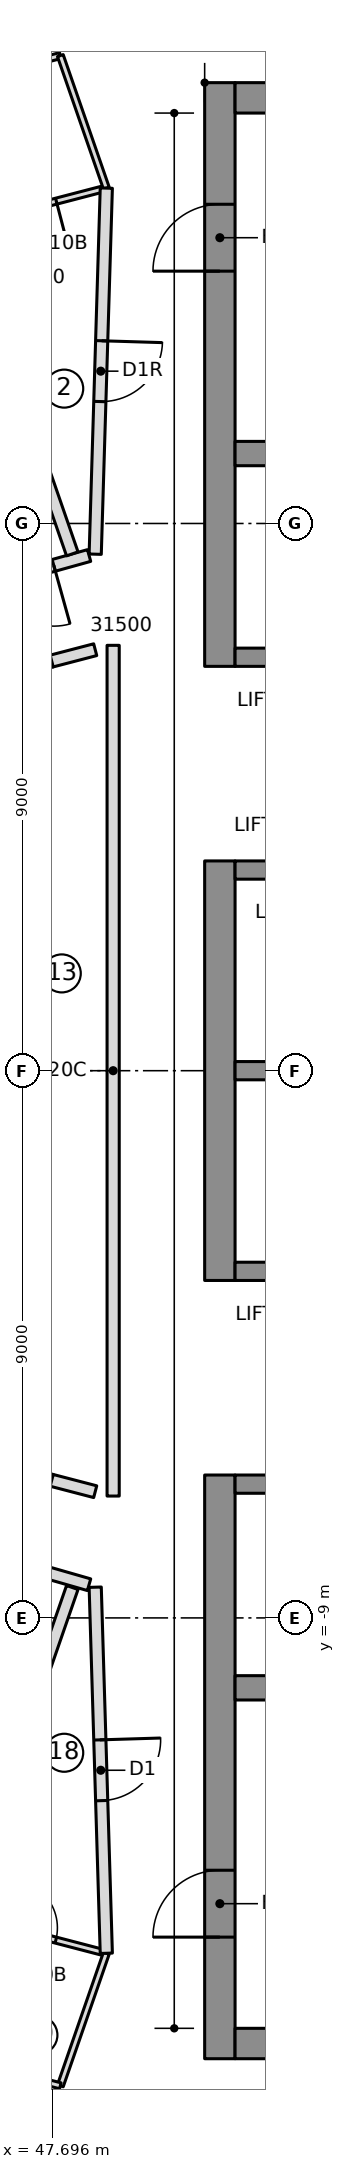
"""IFC4 building model, lengths in metres.
Left out: names, types, materials, properties, quantities, classifications, styles, units other than length and angle.
Written with IfcOpenShell. Run it as: python <this file> out.ifc"""

import sys

from ifc_helpers import new_model, si_unit, direction, frame, frame_2d, origin, place, context, subcontext, project, spatial, rectangle, extrude, element, fill, save


model = new_model("IFC4")
c1 = context("Model", 3, precision=1e-05, world=origin(), true_north=direction((0.0, 1.0)))
c2 = subcontext(c1, "Body", "Model", "MODEL_VIEW")
j1 = project(units=[si_unit("LENGTHUNIT", "METRE"), si_unit("PLANEANGLEUNIT", "RADIAN")], contexts=[c1])
p1 = place(None, origin())
s1 = spatial("IfcSite", under=j1, at=p1, CompositionType="ELEMENT")
p2 = place(p1, origin())
s2 = spatial("IfcBuilding", under=s1, at=p2, CompositionType="ELEMENT")
p3 = place(p2, frame((0.0, 0.0, 289.2)))
s3 = spatial("IfcBuildingStorey", under=s2, at=p3, CompositionType="ELEMENT", Elevation=289.2)
p4 = place(p3, frame((50.45, 6.65, 0.0), z_axis=(0.0, 0.0, 1.0), x_axis=(0.0, 1.0, 0.0)))
e1 = element("IfcWall", 1, at=p4, inside=s3, PredefinedType="SHEAR", context=c2, shape_type="SweptSolid", body=[
    extrude(rectangle(XDim=9.6, YDim=0.5, at=frame_2d((4.8, 0.0))), origin(), (0.0, 0.0, 1.0), 3.55),
])
p5 = place(p4, frame((6.5, 0.0, 0.0)))
e2 = element("IfcOpeningElement", 2, at=p5, cuts=e1, PredefinedType="OPENING", context=c2, shape_type="SweptSolid", body=[
    extrude(rectangle(XDim=1.1, YDim=2.1, at=frame_2d((0.55, 1.05))), frame((0.0, 0.26, 0.0), z_axis=(0.0, -1.0, 0.0), x_axis=(1.0, 0.0, 0.0)), (0.0, 0.0, 1.0), 0.52),
])
p6 = place(p3, frame((50.45, -3.45, 0.0), z_axis=(0.0, 0.0, 1.0), x_axis=(0.0, 1.0, 0.0)))
e3 = element("IfcWall", 3, at=p6, inside=s3, PredefinedType="SHEAR", context=c2, shape_type="SweptSolid", body=[
    extrude(rectangle(XDim=6.9, YDim=0.5, at=frame_2d((3.45, 0.0))), origin(), (0.0, 0.0, 1.0), 3.55),
])
p7 = place(p3, frame((50.45, -16.25, 0.0), z_axis=(0.0, 0.0, 1.0), x_axis=(0.0, 1.0, 0.0)))
e4 = element("IfcWall", 4, at=p7, inside=s3, PredefinedType="SHEAR", context=c2, shape_type="SweptSolid", body=[
    extrude(rectangle(XDim=9.6, YDim=0.5, at=frame_2d((4.8, 0.0))), origin(), (0.0, 0.0, 1.0), 3.55),
])
p8 = place(p7, frame((2.0, 0.0, 0.0)))
e5 = element("IfcOpeningElement", 5, at=p8, cuts=e4, PredefinedType="OPENING", context=c2, shape_type="SweptSolid", body=[
    extrude(rectangle(XDim=1.1, YDim=2.1, at=frame_2d((0.55, 1.05))), frame((0.0, 0.26, 0.0), z_axis=(0.0, -1.0, 0.0), x_axis=(1.0, 0.0, 0.0)), (0.0, 0.0, 1.0), 0.52),
])
for number, where, z_axis, x_axis in (
    (6, (50.7, 16.0, 0.0), (0.0, 0.0, 1.0), (1.0, 0.0, 0.0)),
    (7, (50.7, -16.0, 0.0), (0.0, 0.0, 1.0), (1.0, 0.0, 0.0)),
):
    element("IfcWall", number, at=place(p3, frame(where, z_axis=z_axis, x_axis=x_axis)), inside=s3, PredefinedType="SHEAR", context=c2, shape_type="SweptSolid", body=[
        extrude(rectangle(XDim=13.52, YDim=0.5, at=frame_2d((6.76, 0.0))), origin(), (0.0, 0.0, 1.0), 3.55),
    ])
p9 = place(p3, frame((50.7, 10.15, 0.0), z_axis=(0.0, 0.0, 1.0), x_axis=(1.0, 0.0, 0.0)))
e8 = element("IfcWall", 8, at=p9, inside=s3, PredefinedType="SHEAR", context=c2, shape_type="SweptSolid", body=[
    extrude(rectangle(XDim=13.02, YDim=0.4, at=frame_2d((6.51, 0.0))), origin(), (0.0, 0.0, 1.0), 3.55),
])
p10 = place(p9, frame((0.7, 0.0, 0.0)))
e9 = element("IfcOpeningElement", 9, at=p10, cuts=e8, PredefinedType="OPENING", context=c2, shape_type="SweptSolid", body=[
    extrude(rectangle(XDim=1.1, YDim=2.1, at=frame_2d((0.55, 1.05))), frame((0.0, 0.21, 0.0), z_axis=(0.0, -1.0, 0.0), x_axis=(1.0, 0.0, 0.0)), (0.0, 0.0, 1.0), 0.42),
])
p11 = place(p9, frame((3.5, 0.0, 0.0)))
e10 = element("IfcOpeningElement", 10, at=p11, cuts=e8, PredefinedType="OPENING", context=c2, shape_type="SweptSolid", body=[
    extrude(rectangle(XDim=1.1, YDim=2.1, at=frame_2d((0.55, 1.05))), frame((0.0, 0.21, 0.0), z_axis=(0.0, -1.0, 0.0), x_axis=(1.0, 0.0, 0.0)), (0.0, 0.0, 1.0), 0.42),
])
p12 = place(p3, frame((50.7, -10.15, 0.0), z_axis=(0.0, 0.0, 1.0), x_axis=(1.0, 0.0, 0.0)))
e11 = element("IfcWall", 11, at=p12, inside=s3, PredefinedType="SHEAR", context=c2, shape_type="SweptSolid", body=[
    extrude(rectangle(XDim=13.02, YDim=0.4, at=frame_2d((6.51, 0.0))), origin(), (0.0, 0.0, 1.0), 3.55),
])
p13 = place(p3, frame((50.7, 0.0, 0.0), z_axis=(0.0, 0.0, 1.0), x_axis=(1.0, 0.0, 0.0)))
e12 = element("IfcWall", 12, at=p13, inside=s3, PredefinedType="SHEAR", context=c2, shape_type="SweptSolid", body=[
    extrude(rectangle(XDim=10.9, YDim=0.3, at=frame_2d((5.45, 0.0))), origin(), (0.0, 0.0, 1.0), 3.55),
])
p14 = place(p3, frame((50.7, 3.3, 0.0), z_axis=(0.0, 0.0, 1.0), x_axis=(1.0, 0.0, 0.0)))
e13 = element("IfcWall", 13, at=p14, inside=s3, PredefinedType="SHEAR", context=c2, shape_type="SweptSolid", body=[
    extrude(rectangle(XDim=10.9, YDim=0.3, at=frame_2d((5.45, 0.0))), origin(), (0.0, 0.0, 1.0), 3.55),
])
p15 = place(p14, frame((0.7, 0.0, 0.0)))
e14 = element("IfcOpeningElement", 14, at=p15, cuts=e13, PredefinedType="OPENING", context=c2, shape_type="SweptSolid", body=[
    extrude(rectangle(XDim=1.1, YDim=2.1, at=frame_2d((0.55, 1.05))), frame((0.0, 0.16, 0.0), z_axis=(0.0, -1.0, 0.0), x_axis=(1.0, 0.0, 0.0)), (0.0, 0.0, 1.0), 0.32),
])
p16 = place(p14, frame((3.5, 0.0, 0.0)))
e15 = element("IfcOpeningElement", 15, at=p16, cuts=e13, PredefinedType="OPENING", context=c2, shape_type="SweptSolid", body=[
    extrude(rectangle(XDim=1.1, YDim=2.1, at=frame_2d((0.55, 1.05))), frame((0.0, 0.16, 0.0), z_axis=(0.0, -1.0, 0.0), x_axis=(1.0, 0.0, 0.0)), (0.0, 0.0, 1.0), 0.32),
])
p17 = place(p14, frame((6.4, 0.0, 0.0)))
e16 = element("IfcOpeningElement", 16, at=p17, cuts=e13, PredefinedType="OPENING", context=c2, shape_type="SweptSolid", body=[
    extrude(rectangle(XDim=0.9, YDim=2.1, at=frame_2d((0.45, 1.05))), frame((0.0, 0.16, 0.0), z_axis=(0.0, -1.0, 0.0), x_axis=(1.0, 0.0, 0.0)), (0.0, 0.0, 1.0), 0.32),
])
p18 = place(p14, frame((9.2, 0.0, 0.0)))
e17 = element("IfcOpeningElement", 17, at=p18, cuts=e13, PredefinedType="OPENING", context=c2, shape_type="SweptSolid", body=[
    extrude(rectangle(XDim=0.9, YDim=2.1, at=frame_2d((0.45, 1.05))), frame((0.0, 0.16, 0.0), z_axis=(0.0, -1.0, 0.0), x_axis=(1.0, 0.0, 0.0)), (0.0, 0.0, 1.0), 0.32),
])
p19 = place(p3, frame((50.7, 6.8, 0.0), z_axis=(0.0, 0.0, 1.0), x_axis=(1.0, 0.0, 0.0)))
e18 = element("IfcWall", 18, at=p19, inside=s3, PredefinedType="SHEAR", context=c2, shape_type="SweptSolid", body=[
    extrude(rectangle(XDim=10.9, YDim=0.3, at=frame_2d((5.45, 0.0))), origin(), (0.0, 0.0, 1.0), 3.55),
])
p20 = place(p19, frame((6.4, 0.0, 0.0)))
e19 = element("IfcOpeningElement", 19, at=p20, cuts=e18, PredefinedType="OPENING", context=c2, shape_type="SweptSolid", body=[
    extrude(rectangle(XDim=0.9, YDim=2.1, at=frame_2d((0.45, 1.05))), frame((0.0, 0.16, 0.0), z_axis=(0.0, -1.0, 0.0), x_axis=(1.0, 0.0, 0.0)), (0.0, 0.0, 1.0), 0.32),
])
p21 = place(p19, frame((9.2, 0.0, 0.0)))
e20 = element("IfcOpeningElement", 20, at=p21, cuts=e18, PredefinedType="OPENING", context=c2, shape_type="SweptSolid", body=[
    extrude(rectangle(XDim=0.9, YDim=2.1, at=frame_2d((0.45, 1.05))), frame((0.0, 0.16, 0.0), z_axis=(0.0, -1.0, 0.0), x_axis=(1.0, 0.0, 0.0)), (0.0, 0.0, 1.0), 0.32),
])
p22 = place(p3, frame((50.7, -3.3, 0.0), z_axis=(0.0, 0.0, 1.0), x_axis=(1.0, 0.0, 0.0)))
e21 = element("IfcWall", 21, at=p22, inside=s3, PredefinedType="SHEAR", context=c2, shape_type="SweptSolid", body=[
    extrude(rectangle(XDim=10.9, YDim=0.3, at=frame_2d((5.45, 0.0))), origin(), (0.0, 0.0, 1.0), 3.55),
])
p23 = place(p22, frame((9.1, 0.0, 0.0)))
e22 = element("IfcOpeningElement", 22, at=p23, cuts=e21, PredefinedType="OPENING", context=c2, shape_type="SweptSolid", body=[
    extrude(rectangle(XDim=1.1, YDim=2.1, at=frame_2d((0.55, 1.05))), frame((0.0, 0.16, 0.0), z_axis=(0.0, -1.0, 0.0), x_axis=(1.0, 0.0, 0.0)), (0.0, 0.0, 1.0), 0.32),
])
p24 = place(p3, frame((50.7, -6.8, 0.0), z_axis=(0.0, 0.0, 1.0), x_axis=(1.0, 0.0, 0.0)))
e23 = element("IfcWall", 23, at=p24, inside=s3, PredefinedType="SHEAR", context=c2, shape_type="SweptSolid", body=[
    extrude(rectangle(XDim=10.9, YDim=0.3, at=frame_2d((5.45, 0.0))), origin(), (0.0, 0.0, 1.0), 3.55),
])
p25 = place(p24, frame((6.3, 0.0, 0.0)))
e24 = element("IfcOpeningElement", 24, at=p25, cuts=e23, PredefinedType="OPENING", context=c2, shape_type="SweptSolid", body=[
    extrude(rectangle(XDim=1.1, YDim=2.1, at=frame_2d((0.55, 1.05))), frame((0.0, 0.16, 0.0), z_axis=(0.0, -1.0, 0.0), x_axis=(1.0, 0.0, 0.0)), (0.0, 0.0, 1.0), 0.32),
])
p26 = place(p24, frame((9.1, 0.0, 0.0)))
e25 = element("IfcOpeningElement", 25, at=p26, cuts=e23, PredefinedType="OPENING", context=c2, shape_type="SweptSolid", body=[
    extrude(rectangle(XDim=1.1, YDim=2.1, at=frame_2d((0.55, 1.05))), frame((0.0, 0.16, 0.0), z_axis=(0.0, -1.0, 0.0), x_axis=(1.0, 0.0, 0.0)), (0.0, 0.0, 1.0), 0.32),
])
p27 = place(p24, frame((0.8, 0.0, 0.0)))
e26 = element("IfcOpeningElement", 26, at=p27, cuts=e23, PredefinedType="OPENING", context=c2, shape_type="SweptSolid", body=[
    extrude(rectangle(XDim=0.9, YDim=2.1, at=frame_2d((0.45, 1.05))), frame((0.0, 0.16, 0.0), z_axis=(0.0, -1.0, 0.0), x_axis=(1.0, 0.0, 0.0)), (0.0, 0.0, 1.0), 0.32),
])
p28 = place(p24, frame((3.6, 0.0, 0.0)))
e27 = element("IfcOpeningElement", 27, at=p28, cuts=e23, PredefinedType="OPENING", context=c2, shape_type="SweptSolid", body=[
    extrude(rectangle(XDim=0.9, YDim=2.1, at=frame_2d((0.45, 1.05))), frame((0.0, 0.16, 0.0), z_axis=(0.0, -1.0, 0.0), x_axis=(1.0, 0.0, 0.0)), (0.0, 0.0, 1.0), 0.32),
])
p29 = place(p3, frame((48.299, 8.473, 0.0), z_axis=(0.0, 0.0, 1.0), x_axis=(-0.96343417102, -0.267945140115, 0.0)))
e28 = element("IfcWall", 28, at=p29, inside=s3, PredefinedType="PARTITIONING", context=c2, shape_type="SweptSolid", body=[
    extrude(rectangle(XDim=4.43, YDim=0.2, at=frame_2d((2.215, 0.0))), origin(), (0.0, 0.0, 1.0), 3.25),
])
p30 = place(p29, frame((0.603, 0.0, 0.0)))
e29 = element("IfcOpeningElement", 29, at=p30, cuts=e28, PredefinedType="OPENING", context=c2, shape_type="SweptSolid", body=[
    extrude(rectangle(XDim=1.0, YDim=2.1, at=frame_2d((0.5, 1.05))), frame((0.0, 0.11, 0.0), z_axis=(0.0, -1.0, 0.0), x_axis=(1.0, 0.0, 0.0)), (0.0, 0.0, 1.0), 0.22),
])
p31 = place(p3, frame((48.023, 8.5, 0.0), z_axis=(0.0, 0.0, 1.0), x_axis=(-0.327705598625, 0.944779890043, 0.0)))
e30 = element("IfcWall", 30, at=p31, inside=s3, PredefinedType="PARTITIONING", context=c2, shape_type="SweptSolid", body=[
    extrude(rectangle(XDim=9.61, YDim=0.2, at=frame_2d((4.805, 0.0))), origin(), (0.0, 0.0, 1.0), 3.25),
])
p32 = place(p3, frame((48.583, 14.516, 0.0), z_axis=(0.0, 0.0, 1.0), x_axis=(-0.967665843663, -0.252235633897, 0.0)))
e31 = element("IfcWall", 31, at=p32, inside=s3, PredefinedType="PARTITIONING", context=c2, shape_type="SweptSolid", body=[
    extrude(rectangle(XDim=2.508, YDim=0.1, at=frame_2d((1.254, 0.0))), origin(), (0.0, 0.0, 1.0), 3.25),
])
p33 = place(p32, frame((0.85, 0.0, 0.0)))
e32 = element("IfcOpeningElement", 32, at=p33, cuts=e31, PredefinedType="OPENING", context=c2, shape_type="SweptSolid", body=[
    extrude(rectangle(XDim=0.8, YDim=2.1, at=frame_2d((0.4, 1.05))), frame((0.0, 0.06, 0.0), z_axis=(0.0, -1.0, 0.0), x_axis=(1.0, 0.0, 0.0)), (0.0, 0.0, 1.0), 0.12),
])
p34 = place(p3, frame((45.955, 16.208, 0.0), z_axis=(0.0, 0.0, 1.0), x_axis=(0.967650770907, 0.25229345129, 0.0)))
e33 = element("IfcWall", 33, at=p34, inside=s3, PredefinedType="PARTITIONING", context=c2, shape_type="SweptSolid", body=[
    extrude(rectangle(XDim=1.934, YDim=0.1, at=frame_2d((0.967, 0.0))), origin(), (0.0, 0.0, 1.0), 3.25),
])
p35 = place(p3, frame((47.826, 16.696, 0.0), z_axis=(0.0, 0.0, 1.0), x_axis=(0.327695604762, -0.944783356447, 0.0)))
e34 = element("IfcWall", 34, at=p35, inside=s3, PredefinedType="PARTITIONING", context=c2, shape_type="SweptSolid", body=[
    extrude(rectangle(XDim=2.307, YDim=0.1, at=frame_2d((1.154, 0.0))), origin(), (0.0, 0.0, 1.0), 3.25),
])
p36 = place(p3, frame((40.035, -6.083, 0.0), z_axis=(0.0, 0.0, 1.0), x_axis=(0.961195333593, -0.275868683759, 0.0)))
e35 = element("IfcWall", 35, at=p36, inside=s3, PredefinedType="PARTITIONING", context=c2, shape_type="SweptSolid", body=[
    extrude(rectangle(XDim=8.597, YDim=0.2, at=frame_2d((4.298, 0.0))), origin(), (0.0, 0.0, 1.0), 3.25),
])
p37 = place(p36, frame((3.05, 0.0, 0.0)))
e36 = element("IfcOpeningElement", 36, at=p37, cuts=e35, PredefinedType="OPENING", context=c2, shape_type="SweptSolid", body=[
    extrude(rectangle(XDim=1.5, YDim=2.1, at=frame_2d((0.75, 1.05))), frame((0.0, 0.11, 0.0), z_axis=(0.0, -1.0, 0.0), x_axis=(1.0, 0.0, 0.0)), (0.0, 0.0, 1.0), 0.22),
])
p38 = place(p3, frame((44.874, -17.579, 0.0), z_axis=(0.0, 0.0, 1.0), x_axis=(0.327705598625, 0.944779890043, 0.0)))
e37 = element("IfcWall", 37, at=p38, inside=s3, PredefinedType="PARTITIONING", context=c2, shape_type="SweptSolid", body=[
    extrude(rectangle(XDim=9.61, YDim=0.2, at=frame_2d((4.805, 0.0))), origin(), (0.0, 0.0, 1.0), 3.25),
])
p39 = place(p3, frame((46.156, -13.883, 0.0), z_axis=(0.0, 0.0, 1.0), x_axis=(0.967665843663, -0.252235633897, 0.0)))
e38 = element("IfcWall", 38, at=p39, inside=s3, PredefinedType="PARTITIONING", context=c2, shape_type="SweptSolid", body=[
    extrude(rectangle(XDim=2.508, YDim=0.1, at=frame_2d((1.254, 0.0))), origin(), (0.0, 0.0, 1.0), 3.25),
])
p40 = place(p39, frame((0.85, 0.0, 0.0)))
e39 = element("IfcOpeningElement", 39, at=p40, cuts=e38, PredefinedType="OPENING", context=c2, shape_type="SweptSolid", body=[
    extrude(rectangle(XDim=0.8, YDim=2.1, at=frame_2d((0.4, 1.05))), frame((0.0, 0.06, 0.0), z_axis=(0.0, -1.0, 0.0), x_axis=(1.0, 0.0, 0.0)), (0.0, 0.0, 1.0), 0.12),
])
p41 = place(p3, frame((48.583, -14.516, 0.0), z_axis=(0.0, 0.0, 1.0), x_axis=(-0.327695604762, -0.944783356447, 0.0)))
e40 = element("IfcWall", 40, at=p41, inside=s3, PredefinedType="PARTITIONING", context=c2, shape_type="SweptSolid", body=[
    extrude(rectangle(XDim=2.307, YDim=0.1, at=frame_2d((1.154, 0.0))), origin(), (0.0, 0.0, 1.0), 3.25),
])
p42 = place(p3, frame((47.826, -16.696, 0.0), z_axis=(0.0, 0.0, 1.0), x_axis=(-0.967650770907, 0.25229345129, 0.0)))
e41 = element("IfcWall", 41, at=p42, inside=s3, PredefinedType="PARTITIONING", context=c2, shape_type="SweptSolid", body=[
    extrude(rectangle(XDim=1.934, YDim=0.1, at=frame_2d((0.967, 0.0))), origin(), (0.0, 0.0, 1.0), 3.25),
])
p43 = place(p3, frame((43.918, 5.675, 0.0), z_axis=(0.0, 0.0, 1.0), x_axis=(0.962411212211, 0.271596499628, 0.0)))
e42 = element("IfcWall", 42, at=p43, inside=s3, PredefinedType="PARTITIONING", context=c2, shape_type="SweptSolid", body=[
    extrude(rectangle(XDim=3.913, YDim=0.2, at=frame_2d((1.957, 0.0))), origin(), (0.0, 0.0, 1.0), 3.25),
])
p44 = place(p43, frame((1.457, 0.0, 0.0)))
e43 = element("IfcOpeningElement", 43, at=p44, cuts=e42, PredefinedType="OPENING", context=c2, shape_type="SweptSolid", body=[
    extrude(rectangle(XDim=1.0, YDim=2.1, at=frame_2d((0.5, 1.05))), frame((0.0, 0.11, 0.0), z_axis=(0.0, -1.0, 0.0), x_axis=(1.0, 0.0, 0.0)), (0.0, 0.0, 1.0), 0.22),
])
p45 = place(p3, frame((47.684, -6.738, 0.0), z_axis=(0.0, 0.0, 1.0), x_axis=(-0.962411212211, 0.271596499628, 0.0)))
e44 = element("IfcWall", 44, at=p45, inside=s3, PredefinedType="PARTITIONING", context=c2, shape_type="SweptSolid", body=[
    extrude(rectangle(XDim=3.913, YDim=0.2, at=frame_2d((1.957, 0.0))), origin(), (0.0, 0.0, 1.0), 3.25),
])
for number, where, z_axis, x_axis in (
    (45, (47.684, 6.738, 0.0), (0.0, 0.0, 1.0), (0.968, 0.253, 0.0)),
    (46, (48.4, -6.924, 0.0), (0.0, 0.0, 1.0), (-0.968, 0.253, 0.0)),
):
    element("IfcWall", number, at=place(p3, frame(where, z_axis=z_axis, x_axis=x_axis)), inside=s3, PredefinedType="PARTITIONING", context=c2, shape_type="SweptSolid", body=[
        extrude(rectangle(XDim=0.74, YDim=0.2, at=frame_2d((0.37, 0.0))), origin(), (0.0, 0.0, 1.0), 3.25),
    ])
p46 = place(p3, frame((48.583, 14.516, 0.0), z_axis=(0.0, 0.0, 1.0), x_axis=(-0.030318578026, -0.999540286245, 0.0)))
e47 = element("IfcWall", 47, at=p46, inside=s3, PredefinedType="PARTITIONING", context=c2, shape_type="SweptSolid", body=[
    extrude(rectangle(XDim=6.023, YDim=0.2, at=frame_2d((3.012, 0.0))), origin(), (0.0, 0.0, 1.0), 3.25),
])
p47 = place(p46, frame((2.512, 0.0, 0.0)))
e48 = element("IfcOpeningElement", 48, at=p47, cuts=e47, PredefinedType="OPENING", context=c2, shape_type="SweptSolid", body=[
    extrude(rectangle(XDim=1.0, YDim=2.1, at=frame_2d((0.5, 1.05))), frame((0.0, 0.11, 0.0), z_axis=(0.0, -1.0, 0.0), x_axis=(1.0, 0.0, 0.0)), (0.0, 0.0, 1.0), 0.22),
])
p48 = place(p3, frame((48.4, -8.495, 0.0), z_axis=(0.0, 0.0, 1.0), x_axis=(0.030318578026, -0.999540286245, 0.0)))
e49 = element("IfcWall", 49, at=p48, inside=s3, PredefinedType="PARTITIONING", context=c2, shape_type="SweptSolid", body=[
    extrude(rectangle(XDim=6.023, YDim=0.2, at=frame_2d((3.012, 0.0))), origin(), (0.0, 0.0, 1.0), 3.25),
])
p49 = place(p48, frame((2.512, 0.0, 0.0)))
e50 = element("IfcOpeningElement", 50, at=p49, cuts=e49, PredefinedType="OPENING", context=c2, shape_type="SweptSolid", body=[
    extrude(rectangle(XDim=1.0, YDim=2.1, at=frame_2d((0.5, 1.05))), frame((0.0, 0.11, 0.0), z_axis=(0.0, -1.0, 0.0), x_axis=(1.0, 0.0, 0.0)), (0.0, 0.0, 1.0), 0.22),
])
p50 = place(p3, frame((48.695, 6.996, 0.0), z_axis=(0.0, 0.0, 1.0), x_axis=(0.0, -1.0, 0.0)))
e51 = element("IfcWall", 51, at=p50, inside=s3, PredefinedType="PARTITIONING", context=c2, shape_type="SweptSolid", body=[
    extrude(rectangle(XDim=13.992, YDim=0.2, at=frame_2d((6.996, 0.0))), origin(), (0.0, 0.0, 1.0), 3.25),
])
p51 = place(p30, origin())
e52 = element("IfcDoor", 52, at=p51, inside=s3, OperationType="SINGLE_SWING_RIGHT", PredefinedType="DOOR", context=c2, shape_type="SweptSolid", body=[
    extrude(rectangle(XDim=1.0, YDim=2.1, at=frame_2d((0.5, 1.05))), frame((0.0, 0.025, 0.0), z_axis=(0.0, -1.0, 0.0), x_axis=(1.0, 0.0, 0.0)), (0.0, 0.0, 1.0), 0.05),
])
fill(e29, e52)
p52 = place(p33, origin())
e53 = element("IfcDoor", 53, at=p52, inside=s3, OperationType="SINGLE_SWING_LEFT", PredefinedType="DOOR", context=c2, shape_type="SweptSolid", body=[
    extrude(rectangle(XDim=0.8, YDim=2.1, at=frame_2d((0.4, 1.05))), frame((0.0, 0.025, 0.0), z_axis=(0.0, -1.0, 0.0), x_axis=(1.0, 0.0, 0.0)), (0.0, 0.0, 1.0), 0.05),
])
fill(e32, e53)
p53 = place(p40, origin())
e54 = element("IfcDoor", 54, at=p53, inside=s3, OperationType="SINGLE_SWING_LEFT", PredefinedType="DOOR", context=c2, shape_type="SweptSolid", body=[
    extrude(rectangle(XDim=0.8, YDim=2.1, at=frame_2d((0.4, 1.05))), frame((0.0, 0.025, 0.0), z_axis=(0.0, -1.0, 0.0), x_axis=(1.0, 0.0, 0.0)), (0.0, 0.0, 1.0), 0.05),
])
fill(e39, e54)
p54 = place(p47, origin())
e55 = element("IfcDoor", 55, at=p54, inside=s3, OperationType="SINGLE_SWING_RIGHT", PredefinedType="DOOR", context=c2, shape_type="SweptSolid", body=[
    extrude(rectangle(XDim=1.0, YDim=2.1, at=frame_2d((0.5, 1.05))), frame((0.0, 0.025, 0.0), z_axis=(0.0, -1.0, 0.0), x_axis=(1.0, 0.0, 0.0)), (0.0, 0.0, 1.0), 0.05),
])
fill(e48, e55)
p55 = place(p49, origin())
e56 = element("IfcDoor", 56, at=p55, inside=s3, OperationType="SINGLE_SWING_LEFT", PredefinedType="DOOR", context=c2, shape_type="SweptSolid", body=[
    extrude(rectangle(XDim=1.0, YDim=2.1, at=frame_2d((0.5, 1.05))), frame((0.0, 0.025, 0.0), z_axis=(0.0, -1.0, 0.0), x_axis=(1.0, 0.0, 0.0)), (0.0, 0.0, 1.0), 0.05),
])
fill(e50, e56)
p56 = place(p5, origin())
e57 = element("IfcDoor", 57, at=p56, inside=s3, OperationType="SINGLE_SWING_RIGHT", PredefinedType="DOOR", context=c2, shape_type="SweptSolid", body=[
    extrude(rectangle(XDim=1.1, YDim=2.1, at=frame_2d((0.55, 1.05))), frame((0.0, 0.025, 0.0), z_axis=(0.0, -1.0, 0.0), x_axis=(1.0, 0.0, 0.0)), (0.0, 0.0, 1.0), 0.05),
])
fill(e2, e57)
p57 = place(p8, origin())
e58 = element("IfcDoor", 58, at=p57, inside=s3, OperationType="SINGLE_SWING_RIGHT", PredefinedType="DOOR", context=c2, shape_type="SweptSolid", body=[
    extrude(rectangle(XDim=1.1, YDim=2.1, at=frame_2d((0.55, 1.05))), frame((0.0, 0.025, 0.0), z_axis=(0.0, -1.0, 0.0), x_axis=(1.0, 0.0, 0.0)), (0.0, 0.0, 1.0), 0.05),
])
fill(e5, e58)
save(model, sys.argv[1])
